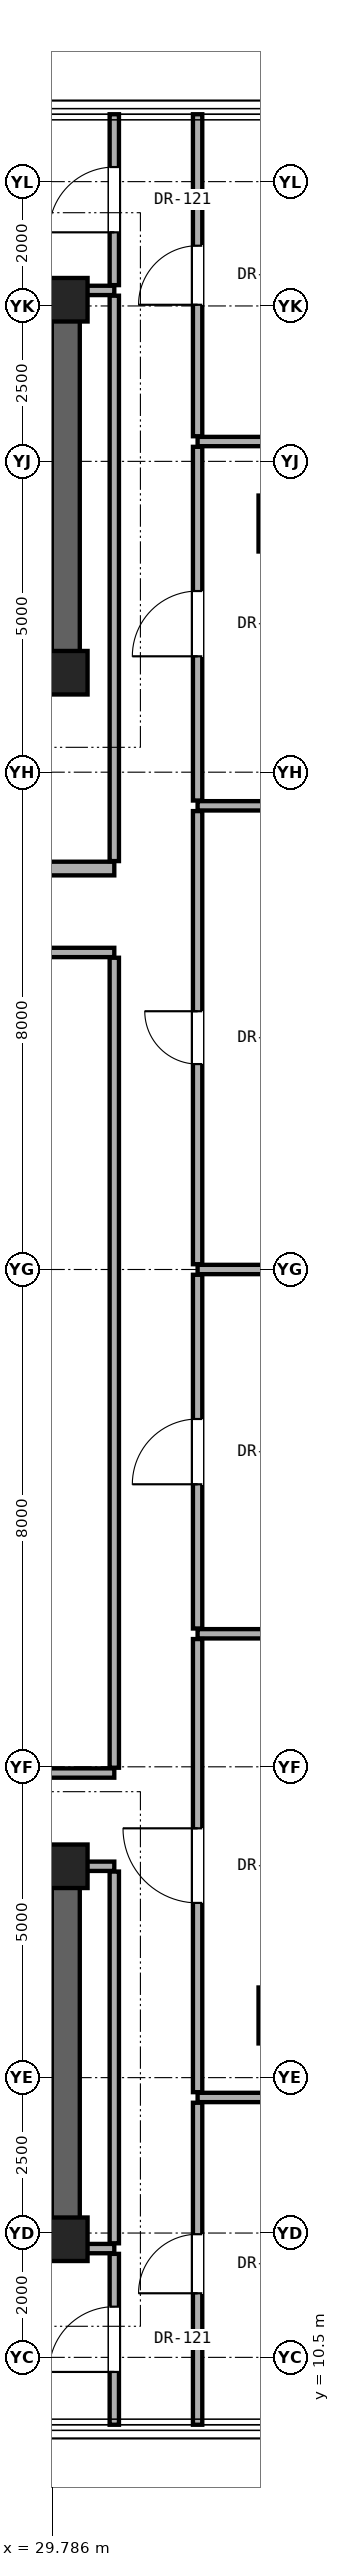
"""IFC4 building model, lengths in metres.
Left out: names, types, materials, properties, quantities, classifications, styles, units other than length and angle.
Written with IfcOpenShell. Run it as: python <this file> out.ifc"""

import sys

from ifc_helpers import new_model, si_unit, direction, frame, frame_2d, origin, origin_2d, place, context, subcontext, project, spatial, rectangle, extrude, element, fill, save


model = new_model("IFC4")
c1 = context("Model", 3, precision=1e-05, world=origin(), true_north=direction((0.0, 1.0)))
c2 = subcontext(c1, "Body", "Model", "MODEL_VIEW")
j1 = project(units=[si_unit("LENGTHUNIT", "METRE"), si_unit("PLANEANGLEUNIT", "RADIAN")], contexts=[c1])
p1 = place(None, origin())
s1 = spatial("IfcSite", under=j1, at=p1, CompositionType="ELEMENT")
p2 = place(p1, origin())
s2 = spatial("IfcBuilding", under=s1, at=p2, CompositionType="ELEMENT")
p3 = place(p2, frame((0.0, 0.0, 259.9)))
s3 = spatial("IfcBuildingStorey", under=s2, at=p3, CompositionType="ELEMENT", Elevation=259.9)
for number, where, z_axis, x_axis in (
    (1, (30.0, 12.4, 0.0), (0.0, 0.0, 1.0), (1.0, 0.0, 0.0)),
    (2, (30.0, 18.4, 0.0), (0.0, 0.0, 1.0), (1.0, 0.0, 0.0)),
    (3, (30.0, 37.6, 0.0), (0.0, 0.0, 1.0), (1.0, 0.0, 0.0)),
    (4, (30.0, 43.6, 0.0), (0.0, 0.0, 1.0), (1.0, 0.0, 0.0)),
):
    element("IfcColumn", number, at=place(p3, frame(where, z_axis=z_axis, x_axis=x_axis)), inside=s3, PredefinedType="COLUMN", context=c2, shape_type="SweptSolid", body=[
        extrude(rectangle(XDim=0.7, YDim=0.7, at=origin_2d()), origin(), (0.0, 0.0, 1.0), 3.6),
    ])
for number, where, z_axis, x_axis in (
    (5, (33.4, 16.0, 0.0), (0.0, 0.0, 1.0), (1.0, 0.0, 0.0)),
    (6, (33.4, 40.0, 0.0), (0.0, 0.0, 1.0), (1.0, 0.0, 0.0)),
):
    element("IfcColumn", number, at=place(p3, frame(where, z_axis=z_axis, x_axis=x_axis)), inside=s3, PredefinedType="PILASTER", context=c2, shape_type="SweptSolid", body=[
        extrude(rectangle(XDim=0.6, YDim=0.9, at=origin_2d()), origin(), (0.0, 0.0, 1.0), 3.6),
    ])
p4 = place(p3, frame((11.0, 43.6, 0.0), z_axis=(0.0, 0.0, 1.0), x_axis=(1.0, 0.0, 0.0)))
e7 = element("IfcWall", 7, at=p4, inside=s3, PredefinedType="SHEAR", context=c2, shape_type="SweptSolid", body=[
    extrude(rectangle(XDim=19.0, YDim=0.45, at=frame_2d((9.5, 0.0))), origin(), (0.0, 0.0, 1.0), 2.95),
])
p5 = place(p3, frame((30.0, 37.6, 0.0), z_axis=(0.0, 0.0, 1.0), x_axis=(0.0, 1.0, 0.0)))
e8 = element("IfcWall", 8, at=p5, inside=s3, PredefinedType="SHEAR", context=c2, shape_type="SweptSolid", body=[
    extrude(rectangle(XDim=6.0, YDim=0.45, at=frame_2d((3.0, 0.0))), origin(), (0.0, 0.0, 1.0), 2.95),
])
p6 = place(p3, frame((11.0, 37.6, 0.0), z_axis=(0.0, 0.0, 1.0), x_axis=(1.0, 0.0, 0.0)))
e9 = element("IfcWall", 9, at=p6, inside=s3, PredefinedType="SHEAR", context=c2, shape_type="SweptSolid", body=[
    extrude(rectangle(XDim=19.0, YDim=0.45, at=frame_2d((9.5, 0.0))), origin(), (0.0, 0.0, 1.0), 2.95),
])
p7 = place(p6, frame((1.06, 0.0, 0.0)))
e10 = element("IfcOpeningElement", 10, at=p7, cuts=e9, PredefinedType="OPENING", context=c2, shape_type="SweptSolid", body=[
    extrude(rectangle(XDim=1.15, YDim=2.2, at=frame_2d((0.575, 1.1))), frame((0.0, 0.235, 0.0), z_axis=(0.0, -1.0, 0.0), x_axis=(1.0, 0.0, 0.0)), (0.0, 0.0, 1.0), 0.47),
])
p8 = place(p6, frame((9.55, 0.0, 0.0)))
e11 = element("IfcOpeningElement", 11, at=p8, cuts=e9, PredefinedType="OPENING", context=c2, shape_type="SweptSolid", body=[
    extrude(rectangle(XDim=1.4, YDim=2.35, at=frame_2d((0.7, 1.175))), frame((0.0, 0.235, 0.0), z_axis=(0.0, -1.0, 0.0), x_axis=(1.0, 0.0, 0.0)), (0.0, 0.0, 1.0), 0.47),
])
p9 = place(p6, frame((11.95, 0.0, 0.0)))
e12 = element("IfcOpeningElement", 12, at=p9, cuts=e9, PredefinedType="OPENING", context=c2, shape_type="SweptSolid", body=[
    extrude(rectangle(XDim=1.4, YDim=2.35, at=frame_2d((0.7, 1.175))), frame((0.0, 0.235, 0.0), z_axis=(0.0, -1.0, 0.0), x_axis=(1.0, 0.0, 0.0)), (0.0, 0.0, 1.0), 0.47),
])
p10 = place(p3, frame((11.0, 12.4, 0.0), z_axis=(0.0, 0.0, 1.0), x_axis=(1.0, 0.0, 0.0)))
e13 = element("IfcWall", 13, at=p10, inside=s3, PredefinedType="SHEAR", context=c2, shape_type="SweptSolid", body=[
    extrude(rectangle(XDim=19.0, YDim=0.45, at=frame_2d((9.5, 0.0))), origin(), (0.0, 0.0, 1.0), 2.95),
])
p11 = place(p3, frame((30.0, 12.4, 0.0), z_axis=(0.0, 0.0, 1.0), x_axis=(0.0, 1.0, 0.0)))
e14 = element("IfcWall", 14, at=p11, inside=s3, PredefinedType="SHEAR", context=c2, shape_type="SweptSolid", body=[
    extrude(rectangle(XDim=6.0, YDim=0.45, at=frame_2d((3.0, 0.0))), origin(), (0.0, 0.0, 1.0), 2.95),
])
p12 = place(p3, frame((11.0, 18.4, 0.0), z_axis=(0.0, 0.0, 1.0), x_axis=(1.0, 0.0, 0.0)))
e15 = element("IfcWall", 15, at=p12, inside=s3, PredefinedType="SHEAR", context=c2, shape_type="SweptSolid", body=[
    extrude(rectangle(XDim=19.0, YDim=0.45, at=frame_2d((9.5, 0.0))), origin(), (0.0, 0.0, 1.0), 2.95),
])
p13 = place(p12, frame((4.175, 0.0, 0.0)))
e16 = element("IfcOpeningElement", 16, at=p13, cuts=e15, PredefinedType="OPENING", context=c2, shape_type="SweptSolid", body=[
    extrude(rectangle(XDim=1.2, YDim=2.25, at=frame_2d((0.6, 1.125))), frame((0.0, 0.235, 0.0), z_axis=(0.0, -1.0, 0.0), x_axis=(1.0, 0.0, 0.0)), (0.0, 0.0, 1.0), 0.47),
])
p14 = place(p12, frame((11.075, 0.0, 0.0)))
e17 = element("IfcOpeningElement", 17, at=p14, cuts=e15, PredefinedType="OPENING", context=c2, shape_type="SweptSolid", body=[
    extrude(rectangle(XDim=0.95, YDim=2.15, at=frame_2d((0.475, 1.075))), frame((0.0, 0.235, 0.0), z_axis=(0.0, -1.0, 0.0), x_axis=(1.0, 0.0, 0.0)), (0.0, 0.0, 1.0), 0.47),
])
p15 = place(p12, frame((14.3, 0.0, 0.0)))
e18 = element("IfcOpeningElement", 18, at=p15, cuts=e15, PredefinedType="OPENING", context=c2, shape_type="SweptSolid", body=[
    extrude(rectangle(XDim=1.3, YDim=2.3, at=frame_2d((0.65, 1.15))), frame((0.0, 0.235, 0.0), z_axis=(0.0, -1.0, 0.0), x_axis=(1.0, 0.0, 0.0)), (0.0, 0.0, 1.0), 0.47),
])
p16 = place(p12, frame((16.6, 0.0, 0.0)))
e19 = element("IfcOpeningElement", 19, at=p16, cuts=e15, PredefinedType="OPENING", context=c2, shape_type="SweptSolid", body=[
    extrude(rectangle(XDim=1.3, YDim=2.3, at=frame_2d((0.65, 1.15))), frame((0.0, 0.235, 0.0), z_axis=(0.0, -1.0, 0.0), x_axis=(1.0, 0.0, 0.0)), (0.0, 0.0, 1.0), 0.47),
])
p17 = place(p3, frame((30.22, 12.25, 0.0), z_axis=(0.0, 0.0, 1.0), x_axis=(1.0, 0.0, 0.0)))
e20 = element("IfcWall", 20, at=p17, inside=s3, PredefinedType="PARTITIONING", context=c2, shape_type="SweptSolid", body=[
    extrude(rectangle(XDim=0.56, YDim=0.15, at=frame_2d((0.28, 0.0))), origin(), (0.0, 0.0, 1.0), 2.95),
])
p18 = place(p3, frame((32.12, 14.681, 0.0), z_axis=(0.0, 0.0, 1.0), x_axis=(1.0, 0.0, 0.0)))
e21 = element("IfcWall", 21, at=p18, inside=s3, PredefinedType="PARTITIONING", context=c2, shape_type="SweptSolid", body=[
    extrude(rectangle(XDim=3.765, YDim=0.15, at=frame_2d((1.882, 0.0))), origin(), (0.0, 0.0, 1.0), 2.95),
])
p19 = place(p3, frame((30.22, 18.4, 0.0), z_axis=(0.0, 0.0, 1.0), x_axis=(1.0, 0.0, 0.0)))
e22 = element("IfcWall", 22, at=p19, inside=s3, PredefinedType="PARTITIONING", context=c2, shape_type="SweptSolid", body=[
    extrude(rectangle(XDim=0.56, YDim=0.15, at=frame_2d((0.28, 0.0))), origin(), (0.0, 0.0, 1.0), 2.393),
])
p20 = place(p3, frame((10.22, 19.9, 0.0), z_axis=(0.0, 0.0, 1.0), x_axis=(1.0, 0.0, 0.0)))
e23 = element("IfcWall", 23, at=p20, inside=s3, PredefinedType="PARTITIONING", context=c2, shape_type="SweptSolid", body=[
    extrude(rectangle(XDim=20.56, YDim=0.15, at=frame_2d((10.28, 0.0))), origin(), (0.0, 0.0, 1.0), 2.086),
])
p21 = place(p20, frame((1.385, 0.0, 0.0)))
e24 = element("IfcOpeningElement", 24, at=p21, cuts=e23, PredefinedType="OPENING", context=c2, shape_type="SweptSolid", body=[
    extrude(rectangle(XDim=0.85, YDim=2.01, at=frame_2d((0.425, 1.005))), frame((0.0, 0.085, 0.0), z_axis=(0.0, -1.0, 0.0), x_axis=(1.0, 0.0, 0.0)), (0.0, 0.0, 1.0), 0.17),
])
p22 = place(p20, frame((3.92, 0.0, 0.0)))
e25 = element("IfcOpeningElement", 25, at=p22, cuts=e23, PredefinedType="OPENING", context=c2, shape_type="SweptSolid", body=[
    extrude(rectangle(XDim=0.85, YDim=2.01, at=frame_2d((0.425, 1.005))), frame((0.0, 0.085, 0.0), z_axis=(0.0, -1.0, 0.0), x_axis=(1.0, 0.0, 0.0)), (0.0, 0.0, 1.0), 0.17),
])
p23 = place(p20, frame((8.552, 0.0, 0.0)))
e26 = element("IfcOpeningElement", 26, at=p23, cuts=e23, PredefinedType="OPENING", context=c2, shape_type="SweptSolid", body=[
    extrude(rectangle(XDim=0.85, YDim=2.01, at=frame_2d((0.425, 1.005))), frame((0.0, 0.085, 0.0), z_axis=(0.0, -1.0, 0.0), x_axis=(1.0, 0.0, 0.0)), (0.0, 0.0, 1.0), 0.17),
])
for number, where, z_axis, x_axis in (
    (27, (32.12, 22.14, 0.0), (0.0, 0.0, 1.0), (1.0, 0.0, 0.0)),
    (28, (32.12, 28.0, 0.0), (0.0, 0.0, 1.0), (1.0, 0.0, 0.0)),
):
    element("IfcWall", number, at=place(p3, frame(where, z_axis=z_axis, x_axis=x_axis)), inside=s3, PredefinedType="PARTITIONING", context=c2, shape_type="SweptSolid", body=[
        extrude(rectangle(XDim=9.05, YDim=0.15, at=frame_2d((4.525, 0.0))), origin(), (0.0, 0.0, 1.0), 2.169),
    ])
p24 = place(p3, frame((10.22, 33.1, 0.0), z_axis=(0.0, 0.0, 1.0), x_axis=(1.0, 0.0, 0.0)))
e29 = element("IfcWall", 29, at=p24, inside=s3, PredefinedType="PARTITIONING", context=c2, shape_type="SweptSolid", body=[
    extrude(rectangle(XDim=20.56, YDim=0.15, at=frame_2d((10.28, 0.0))), origin(), (0.0, 0.0, 1.0), 2.086),
])
p25 = place(p24, frame((15.957, 0.0, 0.0)))
e30 = element("IfcOpeningElement", 30, at=p25, cuts=e29, PredefinedType="OPENING", context=c2, shape_type="SweptSolid", body=[
    extrude(rectangle(XDim=0.85, YDim=2.01, at=frame_2d((0.425, 1.005))), frame((0.0, 0.085, 0.0), z_axis=(0.0, -1.0, 0.0), x_axis=(1.0, 0.0, 0.0)), (0.0, 0.0, 1.0), 0.17),
])
p26 = place(p3, frame((15.59, 34.45, 0.0), z_axis=(0.0, 0.0, 1.0), x_axis=(1.0, 0.0, 0.0)))
e31 = element("IfcWall", 31, at=p26, inside=s3, PredefinedType="SOLIDWALL", context=c2, shape_type="SweptSolid", body=[
    extrude(rectangle(XDim=15.19, YDim=0.22, at=frame_2d((7.595, 0.0))), origin(), (0.0, 0.0, 1.0), 2.086),
])
p27 = place(p26, frame((6.435, 0.0, 0.0)))
e32 = element("IfcOpeningElement", 32, at=p27, cuts=e31, PredefinedType="OPENING", context=c2, shape_type="SweptSolid", body=[
    extrude(rectangle(XDim=0.85, YDim=2.01, at=frame_2d((0.425, 1.005))), frame((0.0, 0.12, 0.0), z_axis=(0.0, -1.0, 0.0), x_axis=(1.0, 0.0, 0.0)), (0.0, 0.0, 1.0), 0.24),
])
p28 = place(p26, frame((11.135, 0.0, 0.0)))
e33 = element("IfcOpeningElement", 33, at=p28, cuts=e31, PredefinedType="OPENING", context=c2, shape_type="SweptSolid", body=[
    extrude(rectangle(XDim=0.85, YDim=2.01, at=frame_2d((0.425, 1.005))), frame((0.0, 0.12, 0.0), z_axis=(0.0, -1.0, 0.0), x_axis=(1.0, 0.0, 0.0)), (0.0, 0.0, 1.0), 0.24),
])
p29 = place(p26, frame((1.775, 0.0, 0.0)))
e34 = element("IfcOpeningElement", 34, at=p29, cuts=e31, PredefinedType="OPENING", context=c2, shape_type="SweptSolid", body=[
    extrude(rectangle(XDim=0.85, YDim=2.01, at=frame_2d((0.425, 1.005))), frame((0.0, 0.12, 0.0), z_axis=(0.0, -1.0, 0.0), x_axis=(1.0, 0.0, 0.0)), (0.0, 0.0, 1.0), 0.24),
])
p30 = place(p3, frame((32.12, 35.459, 0.0), z_axis=(0.0, 0.0, 1.0), x_axis=(1.0, 0.0, 0.0)))
e35 = element("IfcWall", 35, at=p30, inside=s3, PredefinedType="PARTITIONING", context=c2, shape_type="SweptSolid", body=[
    extrude(rectangle(XDim=9.05, YDim=0.15, at=frame_2d((4.525, 0.0))), origin(), (0.0, 0.0, 1.0), 2.169),
])
p31 = place(p3, frame((32.12, 41.319, 0.0), z_axis=(0.0, 0.0, 1.0), x_axis=(1.0, 0.0, 0.0)))
e36 = element("IfcWall", 36, at=p31, inside=s3, PredefinedType="PARTITIONING", context=c2, shape_type="SweptSolid", body=[
    extrude(rectangle(XDim=3.765, YDim=0.15, at=frame_2d((1.882, 0.0))), origin(), (0.0, 0.0, 1.0), 2.95),
])
p32 = place(p3, frame((30.22, 43.75, 0.0), z_axis=(0.0, 0.0, 1.0), x_axis=(1.0, 0.0, 0.0)))
e37 = element("IfcWall", 37, at=p32, inside=s3, PredefinedType="PARTITIONING", context=c2, shape_type="SweptSolid", body=[
    extrude(rectangle(XDim=0.56, YDim=0.15, at=frame_2d((0.28, 0.0))), origin(), (0.0, 0.0, 1.0), 2.95),
])
p33 = place(p3, frame((30.78, 9.416, 0.0), z_axis=(0.0, 0.0, 1.0), x_axis=(0.0, 1.0, 0.0)))
e38 = element("IfcWall", 38, at=p33, inside=s3, PredefinedType="PARTITIONING", context=c2, shape_type="SweptSolid", body=[
    extrude(rectangle(XDim=2.749, YDim=0.15, at=frame_2d((1.375, 0.0))), origin(), (0.0, 0.0, 1.0), 2.95),
])
p34 = place(p33, frame((0.85, 0.0, 0.0)))
e39 = element("IfcOpeningElement", 39, at=p34, cuts=e38, PredefinedType="OPENING", context=c2, shape_type="SweptSolid", body=[
    extrude(rectangle(XDim=1.05, YDim=2.2, at=frame_2d((0.525, 1.1))), frame((0.0, 0.085, 0.0), z_axis=(0.0, -1.0, 0.0), x_axis=(1.0, 0.0, 0.0)), (0.0, 0.0, 1.0), 0.17),
])
p35 = place(p3, frame((30.78, 12.335, 0.0), z_axis=(0.0, 0.0, 1.0), x_axis=(0.0, 1.0, 0.0)))
e40 = element("IfcWall", 40, at=p35, inside=s3, PredefinedType="PARTITIONING", context=c2, shape_type="SweptSolid", body=[
    extrude(rectangle(XDim=5.98, YDim=0.15, at=frame_2d((2.99, 0.0))), origin(), (0.0, 0.0, 1.0), 2.393),
])
p36 = place(p3, frame((30.78, 19.985, 0.0), z_axis=(0.0, 0.0, 1.0), x_axis=(0.0, 1.0, 0.0)))
e41 = element("IfcWall", 41, at=p36, inside=s3, PredefinedType="PARTITIONING", context=c2, shape_type="SweptSolid", body=[
    extrude(rectangle(XDim=13.03, YDim=0.15, at=frame_2d((6.515, 0.0))), origin(), (0.0, 0.0, 1.0), 2.246),
])
p37 = place(p3, frame((30.78, 34.57, 0.0), z_axis=(0.0, 0.0, 1.0), x_axis=(0.0, 1.0, 0.0)))
e42 = element("IfcWall", 42, at=p37, inside=s3, PredefinedType="PARTITIONING", context=c2, shape_type="SweptSolid", body=[
    extrude(rectangle(XDim=9.095, YDim=0.15, at=frame_2d((4.547, 0.0))), origin(), (0.0, 0.0, 1.0), 2.393),
])
p38 = place(p3, frame((30.78, 43.835, 0.0), z_axis=(0.0, 0.0, 1.0), x_axis=(0.0, 1.0, 0.0)))
e43 = element("IfcWall", 43, at=p38, inside=s3, PredefinedType="PARTITIONING", context=c2, shape_type="SweptSolid", body=[
    extrude(rectangle(XDim=2.749, YDim=0.15, at=frame_2d((1.375, 0.0))), origin(), (0.0, 0.0, 1.0), 2.95),
])
p39 = place(p38, frame((0.85, 0.0, 0.0)))
e44 = element("IfcOpeningElement", 44, at=p39, cuts=e43, PredefinedType="OPENING", context=c2, shape_type="SweptSolid", body=[
    extrude(rectangle(XDim=1.05, YDim=2.2, at=frame_2d((0.525, 1.1))), frame((0.0, 0.085, 0.0), z_axis=(0.0, -1.0, 0.0), x_axis=(1.0, 0.0, 0.0)), (0.0, 0.0, 1.0), 0.17),
])
p40 = place(p3, frame((32.12, 9.416, 0.0), z_axis=(0.0, 0.0, 1.0), x_axis=(0.0, 1.0, 0.0)))
e45 = element("IfcWall", 45, at=p40, inside=s3, PredefinedType="PARTITIONING", context=c2, shape_type="SweptSolid", body=[
    extrude(rectangle(XDim=5.18, YDim=0.15, at=frame_2d((2.59, 0.0))), origin(), (0.0, 0.0, 1.0), 2.95),
])
p41 = place(p40, frame((2.115, 0.0, 0.0)))
e46 = element("IfcOpeningElement", 46, at=p41, cuts=e45, PredefinedType="OPENING", context=c2, shape_type="SweptSolid", body=[
    extrude(rectangle(XDim=0.95, YDim=2.15, at=frame_2d((0.475, 1.075))), frame((0.0, 0.085, 0.0), z_axis=(0.0, -1.0, 0.0), x_axis=(1.0, 0.0, 0.0)), (0.0, 0.0, 1.0), 0.17),
])
p42 = place(p3, frame((32.12, 14.766, 0.0), z_axis=(0.0, 0.0, 1.0), x_axis=(0.0, 1.0, 0.0)))
e47 = element("IfcWall", 47, at=p42, inside=s3, PredefinedType="PARTITIONING", context=c2, shape_type="SweptSolid", body=[
    extrude(rectangle(XDim=7.289, YDim=0.15, at=frame_2d((3.645, 0.0))), origin(), (0.0, 0.0, 1.0), 2.393),
])
p43 = place(p42, frame((3.044, 0.0, 0.0)))
e48 = element("IfcOpeningElement", 48, at=p43, cuts=e47, PredefinedType="OPENING", context=c2, shape_type="SweptSolid", body=[
    extrude(rectangle(XDim=1.2, YDim=2.25, at=frame_2d((0.6, 1.125))), frame((0.0, 0.085, 0.0), z_axis=(0.0, -1.0, 0.0), x_axis=(1.0, 0.0, 0.0)), (0.0, 0.0, 1.0), 0.17),
])
p44 = place(p3, frame((32.12, 22.225, 0.0), z_axis=(0.0, 0.0, 1.0), x_axis=(0.0, 1.0, 0.0)))
e49 = element("IfcWall", 49, at=p44, inside=s3, PredefinedType="PARTITIONING", context=c2, shape_type="SweptSolid", body=[
    extrude(rectangle(XDim=5.69, YDim=0.15, at=frame_2d((2.845, 0.0))), origin(), (0.0, 0.0, 1.0), 2.246),
])
p45 = place(p44, frame((2.32, 0.0, 0.0)))
e50 = element("IfcOpeningElement", 50, at=p45, cuts=e49, PredefinedType="OPENING", context=c2, shape_type="SweptSolid", body=[
    extrude(rectangle(XDim=1.05, YDim=2.2, at=frame_2d((0.525, 1.1))), frame((0.0, 0.085, 0.0), z_axis=(0.0, -1.0, 0.0), x_axis=(1.0, 0.0, 0.0)), (0.0, 0.0, 1.0), 0.17),
])
p46 = place(p3, frame((32.12, 28.085, 0.0), z_axis=(0.0, 0.0, 1.0), x_axis=(0.0, 1.0, 0.0)))
e51 = element("IfcWall", 51, at=p46, inside=s3, PredefinedType="PARTITIONING", context=c2, shape_type="SweptSolid", body=[
    extrude(rectangle(XDim=7.289, YDim=0.15, at=frame_2d((3.645, 0.0))), origin(), (0.0, 0.0, 1.0), 2.246),
])
p47 = place(p46, frame((3.219, 0.0, 0.0)))
e52 = element("IfcOpeningElement", 52, at=p47, cuts=e51, PredefinedType="OPENING", context=c2, shape_type="SweptSolid", body=[
    extrude(rectangle(XDim=0.85, YDim=2.01, at=frame_2d((0.425, 1.005))), frame((0.0, 0.085, 0.0), z_axis=(0.0, -1.0, 0.0), x_axis=(1.0, 0.0, 0.0)), (0.0, 0.0, 1.0), 0.17),
])
p48 = place(p3, frame((32.12, 35.544, 0.0), z_axis=(0.0, 0.0, 1.0), x_axis=(0.0, 1.0, 0.0)))
e53 = element("IfcWall", 53, at=p48, inside=s3, PredefinedType="PARTITIONING", context=c2, shape_type="SweptSolid", body=[
    extrude(rectangle(XDim=5.69, YDim=0.15, at=frame_2d((2.845, 0.0))), origin(), (0.0, 0.0, 1.0), 2.393),
])
p49 = place(p48, frame((2.32, 0.0, 0.0)))
e54 = element("IfcOpeningElement", 54, at=p49, cuts=e53, PredefinedType="OPENING", context=c2, shape_type="SweptSolid", body=[
    extrude(rectangle(XDim=1.05, YDim=2.2, at=frame_2d((0.525, 1.1))), frame((0.0, 0.085, 0.0), z_axis=(0.0, -1.0, 0.0), x_axis=(1.0, 0.0, 0.0)), (0.0, 0.0, 1.0), 0.17),
])
p50 = place(p3, frame((32.12, 41.404, 0.0), z_axis=(0.0, 0.0, 1.0), x_axis=(0.0, 1.0, 0.0)))
e55 = element("IfcWall", 55, at=p50, inside=s3, PredefinedType="PARTITIONING", context=c2, shape_type="SweptSolid", body=[
    extrude(rectangle(XDim=5.18, YDim=0.15, at=frame_2d((2.59, 0.0))), origin(), (0.0, 0.0, 1.0), 2.95),
])
p51 = place(p50, frame((2.115, 0.0, 0.0)))
e56 = element("IfcOpeningElement", 56, at=p51, cuts=e55, PredefinedType="OPENING", context=c2, shape_type="SweptSolid", body=[
    extrude(rectangle(XDim=0.95, YDim=2.15, at=frame_2d((0.475, 1.075))), frame((0.0, 0.085, 0.0), z_axis=(0.0, -1.0, 0.0), x_axis=(1.0, 0.0, 0.0)), (0.0, 0.0, 1.0), 0.17),
])
p52 = place(p43, origin())
e57 = element("IfcDoor", 57, at=p52, inside=s3, OperationType="SINGLE_SWING_RIGHT", PredefinedType="DOOR", context=c2, shape_type="SweptSolid", body=[
    extrude(rectangle(XDim=1.2, YDim=2.25, at=frame_2d((0.6, 1.125))), frame((0.0, 0.025, 0.0), z_axis=(0.0, -1.0, 0.0), x_axis=(1.0, 0.0, 0.0)), (0.0, 0.0, 1.0), 0.05),
])
fill(e48, e57)
p53 = place(p45, origin())
e58 = element("IfcDoor", 58, at=p53, inside=s3, OperationType="SINGLE_SWING_LEFT", PredefinedType="DOOR", context=c2, shape_type="SweptSolid", body=[
    extrude(rectangle(XDim=1.05, YDim=2.2, at=frame_2d((0.525, 1.1))), frame((0.0, 0.025, 0.0), z_axis=(0.0, -1.0, 0.0), x_axis=(1.0, 0.0, 0.0)), (0.0, 0.0, 1.0), 0.05),
])
fill(e50, e58)
p54 = place(p47, origin())
e59 = element("IfcDoor", 59, at=p54, inside=s3, OperationType="SINGLE_SWING_RIGHT", PredefinedType="DOOR", context=c2, shape_type="SweptSolid", body=[
    extrude(rectangle(XDim=0.85, YDim=2.01, at=frame_2d((0.425, 1.005))), frame((0.0, 0.025, 0.0), z_axis=(0.0, -1.0, 0.0), x_axis=(1.0, 0.0, 0.0)), (0.0, 0.0, 1.0), 0.05),
])
fill(e52, e59)
p55 = place(p49, origin())
e60 = element("IfcDoor", 60, at=p55, inside=s3, OperationType="SINGLE_SWING_LEFT", PredefinedType="DOOR", context=c2, shape_type="SweptSolid", body=[
    extrude(rectangle(XDim=1.05, YDim=2.2, at=frame_2d((0.525, 1.1))), frame((0.0, 0.025, 0.0), z_axis=(0.0, -1.0, 0.0), x_axis=(1.0, 0.0, 0.0)), (0.0, 0.0, 1.0), 0.05),
])
fill(e54, e60)
p56 = place(p34, origin())
e61 = element("IfcDoor", 61, at=p56, inside=s3, OperationType="SINGLE_SWING_LEFT", PredefinedType="DOOR", context=c2, shape_type="SweptSolid", body=[
    extrude(rectangle(XDim=1.05, YDim=2.2, at=frame_2d((0.525, 1.1))), frame((0.0, 0.025, 0.0), z_axis=(0.0, -1.0, 0.0), x_axis=(1.0, 0.0, 0.0)), (0.0, 0.0, 1.0), 0.05),
])
fill(e39, e61)
p57 = place(p41, origin())
e62 = element("IfcDoor", 62, at=p57, inside=s3, OperationType="SINGLE_SWING_LEFT", PredefinedType="DOOR", context=c2, shape_type="SweptSolid", body=[
    extrude(rectangle(XDim=0.95, YDim=2.15, at=frame_2d((0.475, 1.075))), frame((0.0, 0.025, 0.0), z_axis=(0.0, -1.0, 0.0), x_axis=(1.0, 0.0, 0.0)), (0.0, 0.0, 1.0), 0.05),
])
fill(e46, e62)
p58 = place(p39, origin())
e63 = element("IfcDoor", 63, at=p58, inside=s3, OperationType="SINGLE_SWING_LEFT", PredefinedType="DOOR", context=c2, shape_type="SweptSolid", body=[
    extrude(rectangle(XDim=1.05, YDim=2.2, at=frame_2d((0.525, 1.1))), frame((0.0, 0.025, 0.0), z_axis=(0.0, -1.0, 0.0), x_axis=(1.0, 0.0, 0.0)), (0.0, 0.0, 1.0), 0.05),
])
fill(e44, e63)
p59 = place(p51, origin())
e64 = element("IfcDoor", 64, at=p59, inside=s3, OperationType="SINGLE_SWING_LEFT", PredefinedType="DOOR", context=c2, shape_type="SweptSolid", body=[
    extrude(rectangle(XDim=0.95, YDim=2.15, at=frame_2d((0.475, 1.075))), frame((0.0, 0.025, 0.0), z_axis=(0.0, -1.0, 0.0), x_axis=(1.0, 0.0, 0.0)), (0.0, 0.0, 1.0), 0.05),
])
fill(e56, e64)
save(model, sys.argv[1])
